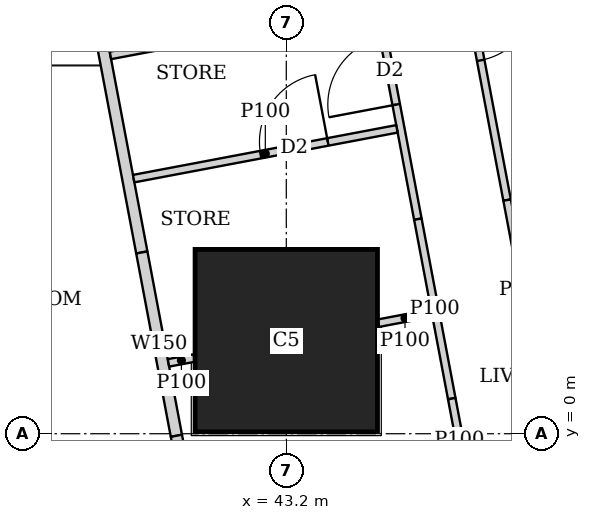
"""IFC4 building model, lengths in metres.
Left out: names, types, materials, properties, quantities, classifications, styles, units other than length and angle.
Written with IfcOpenShell. Run it as: python <this file> out.ifc"""

import sys

from ifc_helpers import new_model, si_unit, direction, frame, frame_2d, origin, origin_2d, place, context, subcontext, project, spatial, rectangle, extrude, element, fill, save


model = new_model("IFC4")
c1 = context("Model", 3, precision=1e-05, world=origin(), true_north=direction((0.0, 1.0)))
c2 = subcontext(c1, "Body", "Model", "MODEL_VIEW")
j1 = project(units=[si_unit("LENGTHUNIT", "METRE"), si_unit("PLANEANGLEUNIT", "RADIAN")], contexts=[c1])
p1 = place(None, origin())
s1 = spatial("IfcSite", under=j1, at=p1, CompositionType="ELEMENT")
p2 = place(p1, origin())
s2 = spatial("IfcBuilding", under=s1, at=p2, CompositionType="ELEMENT")
p3 = place(p2, frame((0.0, 0.0, 212.45)))
s3 = spatial("IfcBuildingStorey", under=s2, at=p3, CompositionType="ELEMENT", Elevation=212.45)
p4 = place(p3, frame((43.2, 1.225, 0.0), z_axis=(0.0, 0.0, 1.0), x_axis=(1.0, 0.0, 0.0)))
e1 = element("IfcColumn", 1, at=p4, inside=s3, PredefinedType="COLUMN", context=c2, shape_type="SweptSolid", body=[
    extrude(rectangle(XDim=2.4, YDim=2.4, at=origin_2d()), origin(), (0.0, 0.0, 1.0), 3.75),
])
p5 = place(p3, frame((50.653, 2.703, 0.0), z_axis=(0.0, 0.0, 1.0), x_axis=(-0.185612026696, 0.982623109613, 0.0)))
e2 = element("IfcWall", 2, at=p5, inside=s3, PredefinedType="SOLIDWALL", context=c2, shape_type="SweptSolid", body=[
    extrude(rectangle(XDim=41.393, YDim=0.2, at=frame_2d((20.697, 0.0))), origin(), (0.0, 0.0, 1.0), 3.5),
])
p6 = place(p5, frame((1.633, 0.0, 0.9)))
e3 = element("IfcOpeningElement", 3, at=p6, cuts=e2, PredefinedType="OPENING", context=c2, shape_type="SweptSolid", body=[
    extrude(rectangle(XDim=1.8, YDim=1.5, at=frame_2d((0.9, 0.75))), frame((0.0, 0.11, 0.0), z_axis=(0.0, -1.0, 0.0), x_axis=(1.0, 0.0, 0.0)), (0.0, 0.0, 1.0), 0.22),
])
p7 = place(p5, frame((6.032, 0.0, 0.9)))
e4 = element("IfcOpeningElement", 4, at=p7, cuts=e2, PredefinedType="OPENING", context=c2, shape_type="SweptSolid", body=[
    extrude(rectangle(XDim=1.8, YDim=1.5, at=frame_2d((0.9, 0.75))), frame((0.0, 0.11, 0.0), z_axis=(0.0, -1.0, 0.0), x_axis=(1.0, 0.0, 0.0)), (0.0, 0.0, 1.0), 0.22),
])
p8 = place(p5, frame((9.848, 0.0, 0.9)))
e5 = element("IfcOpeningElement", 5, at=p8, cuts=e2, PredefinedType="OPENING", context=c2, shape_type="SweptSolid", body=[
    extrude(rectangle(XDim=1.8, YDim=1.5, at=frame_2d((0.9, 0.75))), frame((0.0, 0.11, 0.0), z_axis=(0.0, -1.0, 0.0), x_axis=(1.0, 0.0, 0.0)), (0.0, 0.0, 1.0), 0.22),
])
p9 = place(p5, frame((13.664, 0.0, 0.9)))
e6 = element("IfcOpeningElement", 6, at=p9, cuts=e2, PredefinedType="OPENING", context=c2, shape_type="SweptSolid", body=[
    extrude(rectangle(XDim=1.8, YDim=1.5, at=frame_2d((0.9, 0.75))), frame((0.0, 0.11, 0.0), z_axis=(0.0, -1.0, 0.0), x_axis=(1.0, 0.0, 0.0)), (0.0, 0.0, 1.0), 0.22),
])
p10 = place(p5, frame((17.481, 0.0, 0.9)))
e7 = element("IfcOpeningElement", 7, at=p10, cuts=e2, PredefinedType="OPENING", context=c2, shape_type="SweptSolid", body=[
    extrude(rectangle(XDim=1.8, YDim=1.5, at=frame_2d((0.9, 0.75))), frame((0.0, 0.11, 0.0), z_axis=(0.0, -1.0, 0.0), x_axis=(1.0, 0.0, 0.0)), (0.0, 0.0, 1.0), 0.22),
])
p11 = place(p5, frame((21.297, 0.0, 0.9)))
e8 = element("IfcOpeningElement", 8, at=p11, cuts=e2, PredefinedType="OPENING", context=c2, shape_type="SweptSolid", body=[
    extrude(rectangle(XDim=1.8, YDim=1.5, at=frame_2d((0.9, 0.75))), frame((0.0, 0.11, 0.0), z_axis=(0.0, -1.0, 0.0), x_axis=(1.0, 0.0, 0.0)), (0.0, 0.0, 1.0), 0.22),
])
p12 = place(p5, frame((25.113, 0.0, 0.9)))
e9 = element("IfcOpeningElement", 9, at=p12, cuts=e2, PredefinedType="OPENING", context=c2, shape_type="SweptSolid", body=[
    extrude(rectangle(XDim=1.8, YDim=1.5, at=frame_2d((0.9, 0.75))), frame((0.0, 0.11, 0.0), z_axis=(0.0, -1.0, 0.0), x_axis=(1.0, 0.0, 0.0)), (0.0, 0.0, 1.0), 0.22),
])
p13 = place(p5, frame((28.93, 0.0, 0.9)))
e10 = element("IfcOpeningElement", 10, at=p13, cuts=e2, PredefinedType="OPENING", context=c2, shape_type="SweptSolid", body=[
    extrude(rectangle(XDim=1.8, YDim=1.5, at=frame_2d((0.9, 0.75))), frame((0.0, 0.11, 0.0), z_axis=(0.0, -1.0, 0.0), x_axis=(1.0, 0.0, 0.0)), (0.0, 0.0, 1.0), 0.22),
])
p14 = place(p5, frame((32.746, 0.0, 0.9)))
e11 = element("IfcOpeningElement", 11, at=p14, cuts=e2, PredefinedType="OPENING", context=c2, shape_type="SweptSolid", body=[
    extrude(rectangle(XDim=1.8, YDim=1.5, at=frame_2d((0.9, 0.75))), frame((0.0, 0.11, 0.0), z_axis=(0.0, -1.0, 0.0), x_axis=(1.0, 0.0, 0.0)), (0.0, 0.0, 1.0), 0.22),
])
p15 = place(p5, frame((36.481, 0.0, 0.9)))
e12 = element("IfcOpeningElement", 12, at=p15, cuts=e2, PredefinedType="OPENING", context=c2, shape_type="SweptSolid", body=[
    extrude(rectangle(XDim=1.8, YDim=1.5, at=frame_2d((0.9, 0.75))), frame((0.0, 0.11, 0.0), z_axis=(0.0, -1.0, 0.0), x_axis=(1.0, 0.0, 0.0)), (0.0, 0.0, 1.0), 0.22),
])
p16 = place(p3, frame((33.68, 42.723, 0.0), z_axis=(0.0, 0.0, 1.0), x_axis=(0.185601160014, -0.982625162207, 0.0)))
e13 = element("IfcWall", 13, at=p16, inside=s3, PredefinedType="SOLIDWALL", context=c2, shape_type="SweptSolid", body=[
    extrude(rectangle(XDim=41.051, YDim=0.15, at=frame_2d((20.526, 0.0))), origin(), (0.0, 0.0, 1.0), 2.5),
])
p17 = place(p16, frame((12.307, 0.0, 0.0)))
e14 = element("IfcOpeningElement", 14, at=p17, cuts=e13, PredefinedType="OPENING", context=c2, shape_type="SweptSolid", body=[
    extrude(rectangle(XDim=1.0, YDim=2.1, at=frame_2d((0.5, 1.05))), frame((0.0, 0.085, 0.0), z_axis=(0.0, -1.0, 0.0), x_axis=(1.0, 0.0, 0.0)), (0.0, 0.0, 1.0), 0.17),
])
p18 = place(p16, frame((16.123, 0.0, 0.0)))
e15 = element("IfcOpeningElement", 15, at=p18, cuts=e13, PredefinedType="OPENING", context=c2, shape_type="SweptSolid", body=[
    extrude(rectangle(XDim=1.0, YDim=2.1, at=frame_2d((0.5, 1.05))), frame((0.0, 0.085, 0.0), z_axis=(0.0, -1.0, 0.0), x_axis=(1.0, 0.0, 0.0)), (0.0, 0.0, 1.0), 0.17),
])
p19 = place(p16, frame((30.902, 0.0, 0.0)))
e16 = element("IfcOpeningElement", 16, at=p19, cuts=e13, PredefinedType="OPENING", context=c2, shape_type="SweptSolid", body=[
    extrude(rectangle(XDim=1.0, YDim=2.1, at=frame_2d((0.5, 1.05))), frame((0.0, 0.085, 0.0), z_axis=(0.0, -1.0, 0.0), x_axis=(1.0, 0.0, 0.0)), (0.0, 0.0, 1.0), 0.17),
])
p20 = place(p3, frame((41.299, 2.385, 0.0), z_axis=(0.0, 0.0, 1.0), x_axis=(0.18529731833, -0.982682504077, 0.0)))
e17 = element("IfcWall", 17, at=p20, inside=s3, PredefinedType="SOLIDWALL", context=c2, shape_type="SweptSolid", body=[
    extrude(rectangle(XDim=2.455, YDim=0.15, at=frame_2d((1.227, 0.0))), origin(), (0.0, 0.0, 1.0), 2.05),
])
p21 = place(p3, frame((41.754, -0.027, 0.0), z_axis=(0.0, 0.0, 1.0), x_axis=(0.186404157015, -0.982473149886, 0.0)))
e18 = element("IfcWall", 18, at=p21, inside=s3, PredefinedType="SOLIDWALL", context=c2, shape_type="SweptSolid", body=[
    extrude(rectangle(XDim=0.634, YDim=0.15, at=frame_2d((0.317, 0.0))), origin(), (0.0, 0.0, 1.0), 3.5),
])
p22 = place(p3, frame((44.727, 10.366, 0.0), z_axis=(0.0, 0.0, 1.0), x_axis=(0.185678775129, -0.982610498858, 0.0)))
e19 = element("IfcWall", 19, at=p22, inside=s3, PredefinedType="PARTITIONING", context=c2, shape_type="SweptSolid", body=[
    extrude(rectangle(XDim=7.421, YDim=0.1, at=frame_2d((3.71, 0.0))), origin(), (0.0, 0.0, 1.0), 3.5),
])
p23 = place(p22, frame((0.151, 0.0, 0.0)))
e20 = element("IfcOpeningElement", 20, at=p23, cuts=e19, PredefinedType="OPENING", context=c2, shape_type="SweptSolid", body=[
    extrude(rectangle(XDim=0.9, YDim=2.1, at=frame_2d((0.45, 1.05))), frame((0.0, 0.06, 0.0), z_axis=(0.0, -1.0, 0.0), x_axis=(1.0, 0.0, 0.0)), (0.0, 0.0, 1.0), 0.12),
])
p24 = place(p22, frame((4.65, 0.0, 0.0)))
e21 = element("IfcOpeningElement", 21, at=p24, cuts=e19, PredefinedType="OPENING", context=c2, shape_type="SweptSolid", body=[
    extrude(rectangle(XDim=0.9, YDim=2.1, at=frame_2d((0.45, 1.05))), frame((0.0, 0.06, 0.0), z_axis=(0.0, -1.0, 0.0), x_axis=(1.0, 0.0, 0.0)), (0.0, 0.0, 1.0), 0.12),
])
p25 = place(p3, frame((46.105, 3.074, 0.0), z_axis=(0.0, 0.0, 1.0), x_axis=(0.185631845838, -0.982619365681, 0.0)))
e22 = element("IfcWall", 22, at=p25, inside=s3, PredefinedType="PARTITIONING", context=c2, shape_type="SweptSolid", body=[
    extrude(rectangle(XDim=2.403, YDim=0.1, at=frame_2d((1.201, 0.0))), origin(), (0.0, 0.0, 1.0), 2.05),
])
p26 = place(p3, frame((43.949, 8.02, 0.0), z_axis=(0.0, 0.0, 1.0), x_axis=(0.185656792073, -0.982614652627, 0.0)))
e23 = element("IfcWall", 23, at=p26, inside=s3, PredefinedType="PARTITIONING", context=c2, shape_type="SweptSolid", body=[
    extrude(rectangle(XDim=5.289, YDim=0.1, at=frame_2d((2.645, 0.0))), origin(), (0.0, 0.0, 1.0), 3.5),
])
p27 = place(p26, frame((1.2, 0.0, 0.0)))
e24 = element("IfcOpeningElement", 24, at=p27, cuts=e23, PredefinedType="OPENING", context=c2, shape_type="SweptSolid", body=[
    extrude(rectangle(XDim=0.9, YDim=2.1, at=frame_2d((0.45, 1.05))), frame((0.0, 0.06, 0.0), z_axis=(0.0, -1.0, 0.0), x_axis=(1.0, 0.0, 0.0)), (0.0, 0.0, 1.0), 0.12),
])
p28 = place(p26, frame((2.855, 0.0, 0.0)))
e25 = element("IfcOpeningElement", 25, at=p28, cuts=e23, PredefinedType="OPENING", context=c2, shape_type="SweptSolid", body=[
    extrude(rectangle(XDim=0.9, YDim=2.1, at=frame_2d((0.45, 1.05))), frame((0.0, 0.06, 0.0), z_axis=(0.0, -1.0, 0.0), x_axis=(1.0, 0.0, 0.0)), (0.0, 0.0, 1.0), 0.12),
])
p29 = place(p3, frame((44.931, 2.823, 0.0), z_axis=(0.0, 0.0, 1.0), x_axis=(0.185631845838, -0.982619365681, 0.0)))
e26 = element("IfcWall", 26, at=p29, inside=s3, PredefinedType="PARTITIONING", context=c2, shape_type="SweptSolid", body=[
    extrude(rectangle(XDim=2.403, YDim=0.1, at=frame_2d((1.201, 0.0))), origin(), (0.0, 0.0, 1.0), 2.05),
])
p30 = place(p3, frame((45.377, 0.462, 0.0), z_axis=(0.0, 0.0, 1.0), x_axis=(0.185513480919, -0.982641719243, 0.0)))
e27 = element("IfcWall", 27, at=p30, inside=s3, PredefinedType="PARTITIONING", context=c2, shape_type="SweptSolid", body=[
    extrude(rectangle(XDim=1.095, YDim=0.1, at=frame_2d((0.547, 0.0))), origin(), (0.0, 0.0, 1.0), 3.5),
])
p31 = place(p3, frame((45.114, 1.587, 0.0), z_axis=(0.0, 0.0, 1.0), x_axis=(-0.982671022916, -0.185358195723, 0.0)))
e28 = element("IfcWall", 28, at=p31, inside=s3, PredefinedType="PARTITIONING", context=c2, shape_type="SweptSolid", body=[
    extrude(rectangle(XDim=0.717, YDim=0.1, at=frame_2d((0.358, 0.0))), origin(), (0.0, 0.0, 1.0), 2.05),
])
p32 = place(p3, frame((41.99, 0.996, 0.0), z_axis=(0.0, 0.0, 1.0), x_axis=(-0.982639822555, -0.185523527159, 0.0)))
e29 = element("IfcWall", 29, at=p32, inside=s3, PredefinedType="PARTITIONING", context=c2, shape_type="SweptSolid", body=[
    extrude(rectangle(XDim=0.346, YDim=0.1, at=frame_2d((0.173, 0.0))), origin(), (0.0, 0.0, 1.0), 2.05),
])
p33 = place(p3, frame((44.35, 5.631, 0.0), z_axis=(0.0, 0.0, 1.0), x_axis=(-0.982638553676, -0.185530247748, 0.0)))
e30 = element("IfcWall", 30, at=p33, inside=s3, PredefinedType="PARTITIONING", context=c2, shape_type="SweptSolid", body=[
    extrude(rectangle(XDim=3.525, YDim=0.1, at=frame_2d((1.763, 0.0))), origin(), (0.0, 0.0, 1.0), 3.5),
])
p34 = place(p3, frame((41.192, 3.356, 0.0), z_axis=(0.0, 0.0, 1.0), x_axis=(0.982588017646, 0.185797706064, 0.0)))
e31 = element("IfcWall", 31, at=p34, inside=s3, PredefinedType="PARTITIONING", context=c2, shape_type="SweptSolid", body=[
    extrude(rectangle(XDim=3.525, YDim=0.1, at=frame_2d((1.763, 0.0))), origin(), (0.0, 0.0, 1.0), 3.5),
])
p35 = place(p34, frame((1.7, 0.0, 0.0)))
e32 = element("IfcOpeningElement", 32, at=p35, cuts=e31, PredefinedType="OPENING", context=c2, shape_type="SweptSolid", body=[
    extrude(rectangle(XDim=0.9, YDim=2.1, at=frame_2d((0.45, 1.05))), frame((0.0, 0.06, 0.0), z_axis=(0.0, -1.0, 0.0), x_axis=(1.0, 0.0, 0.0)), (0.0, 0.0, 1.0), 0.12),
])
p36 = place(p24, origin())
e33 = element("IfcDoor", 33, at=p36, inside=s3, OperationType="SINGLE_SWING_LEFT", PredefinedType="DOOR", context=c2, shape_type="SweptSolid", body=[
    extrude(rectangle(XDim=0.9, YDim=2.1, at=frame_2d((0.45, 1.05))), frame((0.0, 0.025, 0.0), z_axis=(0.0, -1.0, 0.0), x_axis=(1.0, 0.0, 0.0)), (0.0, 0.0, 1.0), 0.05),
])
fill(e21, e33)
p37 = place(p28, origin())
e34 = element("IfcDoor", 34, at=p37, inside=s3, OperationType="SINGLE_SWING_LEFT", PredefinedType="DOOR", context=c2, shape_type="SweptSolid", body=[
    extrude(rectangle(XDim=0.9, YDim=2.1, at=frame_2d((0.45, 1.05))), frame((0.0, 0.025, 0.0), z_axis=(0.0, -1.0, 0.0), x_axis=(1.0, 0.0, 0.0)), (0.0, 0.0, 1.0), 0.05),
])
fill(e25, e34)
p38 = place(p35, origin())
e35 = element("IfcDoor", 35, at=p38, inside=s3, OperationType="SINGLE_SWING_RIGHT", PredefinedType="DOOR", context=c2, shape_type="SweptSolid", body=[
    extrude(rectangle(XDim=0.9, YDim=2.1, at=frame_2d((0.45, 1.05))), frame((0.0, 0.025, 0.0), z_axis=(0.0, -1.0, 0.0), x_axis=(1.0, 0.0, 0.0)), (0.0, 0.0, 1.0), 0.05),
])
fill(e32, e35)
save(model, sys.argv[1])
